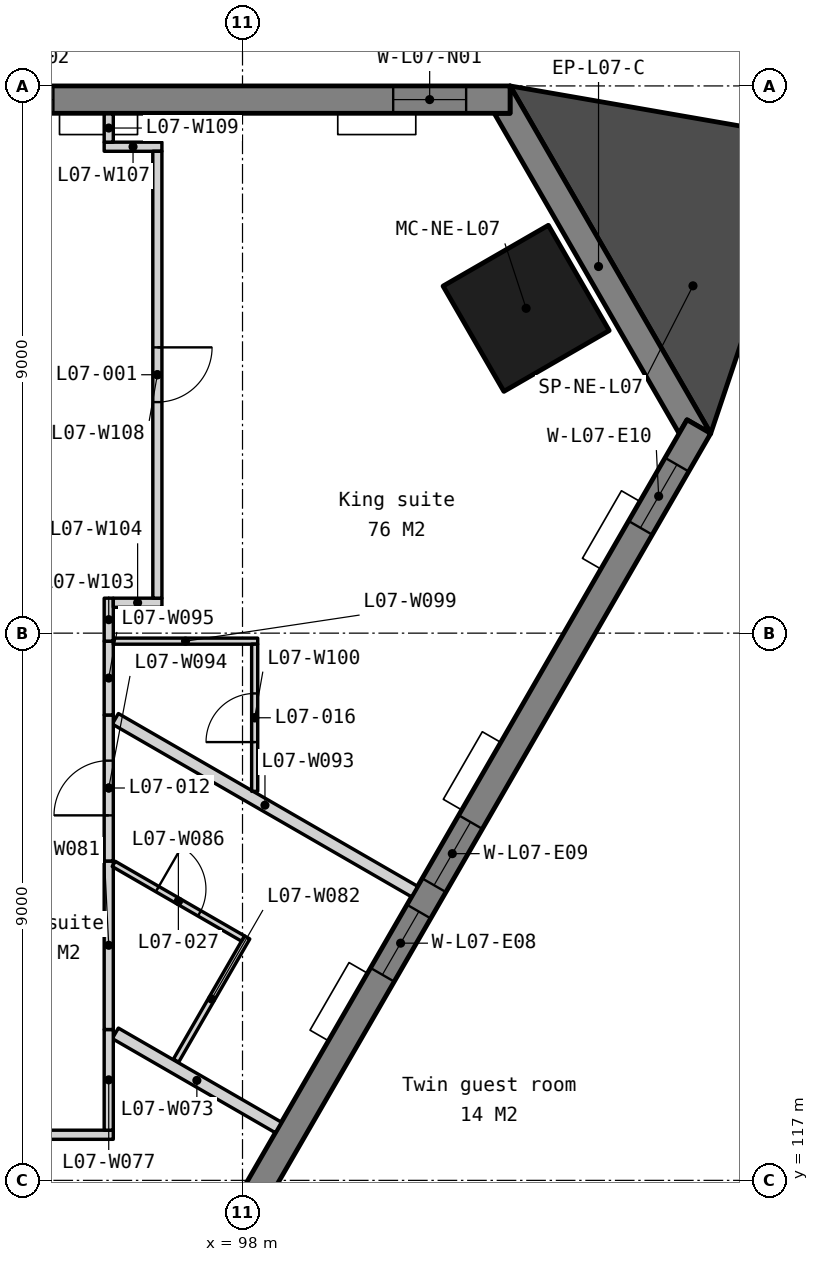
"""IFC4 building model, lengths in metres.
Left out: names, types, materials, properties, quantities, classifications, styles, units other than length and angle.
Written with IfcOpenShell. Run it as: python <this file> out.ifc"""

import sys

from ifc_helpers import new_model, si_unit, direction, frame, frame_2d, origin, origin_2d, place, context, subcontext, project, spatial, polyline, rectangle, outline, extrude, element, fill, save


model = new_model("IFC4")
c1 = context("Model", 3, precision=1e-05, world=origin(), true_north=direction((0.0, 1.0)))
c2 = subcontext(c1, "Body", "Model", "MODEL_VIEW")
j1 = project(units=[si_unit("LENGTHUNIT", "METRE"), si_unit("PLANEANGLEUNIT", "RADIAN")], contexts=[c1])
p1 = place(None, origin())
s1 = spatial("IfcSite", under=j1, at=p1, CompositionType="ELEMENT")
p2 = place(p1, origin())
s2 = spatial("IfcBuilding", under=s1, at=p2, CompositionType="ELEMENT")
p3 = place(p2, frame((0.0, 0.0, 38.5)))
s3 = spatial("IfcBuildingStorey", under=s2, at=p3, CompositionType="ELEMENT", Elevation=38.5)
p4 = place(p3, frame((102.664, 131.342, 0.0), z_axis=(0.0, 0.0, 1.0), x_axis=(-0.5, 0.866025403784, 0.0)))
e1 = element("IfcColumn", 1, at=p4, inside=s3, PredefinedType="COLUMN", context=c2, shape_type="SweptSolid", body=[
    extrude(rectangle(XDim=2.0, YDim=2.0, at=origin_2d()), origin(), (0.0, 0.0, 1.0), 3.5),
])
p5 = place(p3, frame((0.0, 0.0, -0.15)))
e2 = element("IfcWall", 2, at=p5, inside=s3, PredefinedType="SOLIDWALL", context=c2, shape_type="SweptSolid", body=[
    extrude(outline(polyline([(105.7, 129.284), (105.31, 129.509), (105.18, 129.284), (102.14, 134.55), (102.4, 134.55), (102.4, 135.0), (105.7, 129.284)])), origin(), (0.0, 0.0, 1.0), 3.5),
])
p6 = place(p3, frame((102.4, 134.775, -0.15), z_axis=(0.0, 0.0, 1.0), x_axis=(-1.0, 0.0, 0.0)))
e3 = element("IfcWall", 3, at=p6, inside=s3, PredefinedType="SOLIDWALL", context=c2, shape_type="SweptSolid", body=[
    extrude(outline(polyline([(44.8, 0.0), (44.8, 3.5), (0.0, 3.5), (0.0, 0.0), (44.8, 0.0)])), frame((0.0, 0.225, 0.0), z_axis=(0.0, -1.0, 0.0), x_axis=(1.0, 0.0, 0.0)), (0.0, 0.0, 1.0), 0.45),
])
p7 = place(p6, frame((0.722, 0.0, 1.05)))
e4 = element("IfcOpeningElement", 4, at=p7, cuts=e3, PredefinedType="OPENING", context=c2, shape_type="SweptSolid", body=[
    extrude(rectangle(XDim=1.2, YDim=1.5, at=frame_2d((0.6, 0.75))), frame((0.0, 0.235, 0.0), z_axis=(0.0, -1.0, 0.0), x_axis=(1.0, 0.0, 0.0)), (0.0, 0.0, 1.0), 0.47),
])
p8 = place(p6, frame((7.51, 0.0, 1.05)))
e5 = element("IfcOpeningElement", 5, at=p8, cuts=e3, PredefinedType="OPENING", context=c2, shape_type="SweptSolid", body=[
    extrude(rectangle(XDim=1.2, YDim=1.5, at=frame_2d((0.6, 0.75))), frame((0.0, 0.235, 0.0), z_axis=(0.0, -1.0, 0.0), x_axis=(1.0, 0.0, 0.0)), (0.0, 0.0, 1.0), 0.47),
])
p9 = place(p6, frame((9.21, 0.0, 1.05)))
e6 = element("IfcOpeningElement", 6, at=p9, cuts=e3, PredefinedType="OPENING", context=c2, shape_type="SweptSolid", body=[
    extrude(rectangle(XDim=1.2, YDim=1.5, at=frame_2d((0.6, 0.75))), frame((0.0, 0.235, 0.0), z_axis=(0.0, -1.0, 0.0), x_axis=(1.0, 0.0, 0.0)), (0.0, 0.0, 1.0), 0.47),
])
p10 = place(p6, frame((16.47, 0.0, 1.05)))
e7 = element("IfcOpeningElement", 7, at=p10, cuts=e3, PredefinedType="OPENING", context=c2, shape_type="SweptSolid", body=[
    extrude(rectangle(XDim=1.2, YDim=1.5, at=frame_2d((0.6, 0.75))), frame((0.0, 0.235, 0.0), z_axis=(0.0, -1.0, 0.0), x_axis=(1.0, 0.0, 0.0)), (0.0, 0.0, 1.0), 0.47),
])
p11 = place(p6, frame((18.17, 0.0, 1.05)))
e8 = element("IfcOpeningElement", 8, at=p11, cuts=e3, PredefinedType="OPENING", context=c2, shape_type="SweptSolid", body=[
    extrude(rectangle(XDim=1.2, YDim=1.5, at=frame_2d((0.6, 0.75))), frame((0.0, 0.235, 0.0), z_axis=(0.0, -1.0, 0.0), x_axis=(1.0, 0.0, 0.0)), (0.0, 0.0, 1.0), 0.47),
])
p12 = place(p6, frame((25.43, 0.0, 1.05)))
e9 = element("IfcOpeningElement", 9, at=p12, cuts=e3, PredefinedType="OPENING", context=c2, shape_type="SweptSolid", body=[
    extrude(rectangle(XDim=1.2, YDim=1.5, at=frame_2d((0.6, 0.75))), frame((0.0, 0.235, 0.0), z_axis=(0.0, -1.0, 0.0), x_axis=(1.0, 0.0, 0.0)), (0.0, 0.0, 1.0), 0.47),
])
p13 = place(p6, frame((27.13, 0.0, 1.05)))
e10 = element("IfcOpeningElement", 10, at=p13, cuts=e3, PredefinedType="OPENING", context=c2, shape_type="SweptSolid", body=[
    extrude(rectangle(XDim=1.2, YDim=1.5, at=frame_2d((0.6, 0.75))), frame((0.0, 0.235, 0.0), z_axis=(0.0, -1.0, 0.0), x_axis=(1.0, 0.0, 0.0)), (0.0, 0.0, 1.0), 0.47),
])
p14 = place(p6, frame((34.39, 0.0, 1.05)))
e11 = element("IfcOpeningElement", 11, at=p14, cuts=e3, PredefinedType="OPENING", context=c2, shape_type="SweptSolid", body=[
    extrude(rectangle(XDim=1.2, YDim=1.5, at=frame_2d((0.6, 0.75))), frame((0.0, 0.235, 0.0), z_axis=(0.0, -1.0, 0.0), x_axis=(1.0, 0.0, 0.0)), (0.0, 0.0, 1.0), 0.47),
])
p15 = place(p6, frame((36.09, 0.0, 1.05)))
e12 = element("IfcOpeningElement", 12, at=p15, cuts=e3, PredefinedType="OPENING", context=c2, shape_type="SweptSolid", body=[
    extrude(rectangle(XDim=1.2, YDim=1.5, at=frame_2d((0.6, 0.75))), frame((0.0, 0.235, 0.0), z_axis=(0.0, -1.0, 0.0), x_axis=(1.0, 0.0, 0.0)), (0.0, 0.0, 1.0), 0.47),
])
p16 = place(p6, frame((42.878, 0.0, 1.05)))
e13 = element("IfcOpeningElement", 13, at=p16, cuts=e3, PredefinedType="OPENING", context=c2, shape_type="SweptSolid", body=[
    extrude(rectangle(XDim=1.2, YDim=1.5, at=frame_2d((0.6, 0.75))), frame((0.0, 0.235, 0.0), z_axis=(0.0, -1.0, 0.0), x_axis=(1.0, 0.0, 0.0)), (0.0, 0.0, 1.0), 0.47),
])
p17 = place(p3, frame((83.105, 90.599, -0.15), z_axis=(0.0, 0.0, 1.0), x_axis=(0.499999201451, 0.866025864826, 0.0)))
e14 = element("IfcWall", 14, at=p17, inside=s3, PredefinedType="SOLIDWALL", context=c2, shape_type="SweptSolid", body=[
    extrude(outline(polyline([(44.8, 0.0), (44.8, 3.5), (0.0, 3.5), (0.0, 0.0), (44.8, 0.0)])), frame((0.0, 0.225, 0.0), z_axis=(0.0, -1.0, 0.0), x_axis=(1.0, 0.0, 0.0)), (0.0, 0.0, 1.0), 0.45),
])
p18 = place(p17, frame((0.722, 0.0, 1.05)))
e15 = element("IfcOpeningElement", 15, at=p18, cuts=e14, PredefinedType="OPENING", context=c2, shape_type="SweptSolid", body=[
    extrude(rectangle(XDim=1.2, YDim=1.5, at=frame_2d((0.6, 0.75))), frame((0.0, 0.235, 0.0), z_axis=(0.0, -1.0, 0.0), x_axis=(1.0, 0.0, 0.0)), (0.0, 0.0, 1.0), 0.47),
])
p19 = place(p17, frame((7.51, 0.0, 1.05)))
e16 = element("IfcOpeningElement", 16, at=p19, cuts=e14, PredefinedType="OPENING", context=c2, shape_type="SweptSolid", body=[
    extrude(rectangle(XDim=1.2, YDim=1.5, at=frame_2d((0.6, 0.75))), frame((0.0, 0.235, 0.0), z_axis=(0.0, -1.0, 0.0), x_axis=(1.0, 0.0, 0.0)), (0.0, 0.0, 1.0), 0.47),
])
p20 = place(p17, frame((9.21, 0.0, 1.05)))
e17 = element("IfcOpeningElement", 17, at=p20, cuts=e14, PredefinedType="OPENING", context=c2, shape_type="SweptSolid", body=[
    extrude(rectangle(XDim=1.2, YDim=1.5, at=frame_2d((0.6, 0.75))), frame((0.0, 0.235, 0.0), z_axis=(0.0, -1.0, 0.0), x_axis=(1.0, 0.0, 0.0)), (0.0, 0.0, 1.0), 0.47),
])
p21 = place(p17, frame((16.47, 0.0, 1.05)))
e18 = element("IfcOpeningElement", 18, at=p21, cuts=e14, PredefinedType="OPENING", context=c2, shape_type="SweptSolid", body=[
    extrude(rectangle(XDim=1.2, YDim=1.5, at=frame_2d((0.6, 0.75))), frame((0.0, 0.235, 0.0), z_axis=(0.0, -1.0, 0.0), x_axis=(1.0, 0.0, 0.0)), (0.0, 0.0, 1.0), 0.47),
])
p22 = place(p17, frame((18.17, 0.0, 1.05)))
e19 = element("IfcOpeningElement", 19, at=p22, cuts=e14, PredefinedType="OPENING", context=c2, shape_type="SweptSolid", body=[
    extrude(rectangle(XDim=1.2, YDim=1.5, at=frame_2d((0.6, 0.75))), frame((0.0, 0.235, 0.0), z_axis=(0.0, -1.0, 0.0), x_axis=(1.0, 0.0, 0.0)), (0.0, 0.0, 1.0), 0.47),
])
p23 = place(p17, frame((25.43, 0.0, 1.05)))
e20 = element("IfcOpeningElement", 20, at=p23, cuts=e14, PredefinedType="OPENING", context=c2, shape_type="SweptSolid", body=[
    extrude(rectangle(XDim=1.2, YDim=1.5, at=frame_2d((0.6, 0.75))), frame((0.0, 0.235, 0.0), z_axis=(0.0, -1.0, 0.0), x_axis=(1.0, 0.0, 0.0)), (0.0, 0.0, 1.0), 0.47),
])
p24 = place(p17, frame((27.13, 0.0, 1.05)))
e21 = element("IfcOpeningElement", 21, at=p24, cuts=e14, PredefinedType="OPENING", context=c2, shape_type="SweptSolid", body=[
    extrude(rectangle(XDim=1.2, YDim=1.5, at=frame_2d((0.6, 0.75))), frame((0.0, 0.235, 0.0), z_axis=(0.0, -1.0, 0.0), x_axis=(1.0, 0.0, 0.0)), (0.0, 0.0, 1.0), 0.47),
])
p25 = place(p17, frame((34.39, 0.0, 1.05)))
e22 = element("IfcOpeningElement", 22, at=p25, cuts=e14, PredefinedType="OPENING", context=c2, shape_type="SweptSolid", body=[
    extrude(rectangle(XDim=1.2, YDim=1.5, at=frame_2d((0.6, 0.75))), frame((0.0, 0.235, 0.0), z_axis=(0.0, -1.0, 0.0), x_axis=(1.0, 0.0, 0.0)), (0.0, 0.0, 1.0), 0.47),
])
p26 = place(p17, frame((36.09, 0.0, 1.05)))
e23 = element("IfcOpeningElement", 23, at=p26, cuts=e14, PredefinedType="OPENING", context=c2, shape_type="SweptSolid", body=[
    extrude(rectangle(XDim=1.2, YDim=1.5, at=frame_2d((0.6, 0.75))), frame((0.0, 0.235, 0.0), z_axis=(0.0, -1.0, 0.0), x_axis=(1.0, 0.0, 0.0)), (0.0, 0.0, 1.0), 0.47),
])
p27 = place(p17, frame((42.878, 0.0, 1.05)))
e24 = element("IfcOpeningElement", 24, at=p27, cuts=e14, PredefinedType="OPENING", context=c2, shape_type="SweptSolid", body=[
    extrude(rectangle(XDim=1.2, YDim=1.5, at=frame_2d((0.6, 0.75))), frame((0.0, 0.235, 0.0), z_axis=(0.0, -1.0, 0.0), x_axis=(1.0, 0.0, 0.0)), (0.0, 0.0, 1.0), 0.47),
])
p28 = place(p3, frame((0.0, 0.0, -0.15)))
e25 = element("IfcWall", 25, at=p28, inside=s3, PredefinedType="SOLIDWALL", context=c2, shape_type="SweptSolid", body=[
    extrude(outline(polyline([(105.7, 129.284), (107.336, 134.14), (102.4, 135.0), (105.7, 129.284)])), origin(), (0.0, 0.0, 1.0), 3.5),
])
p29 = place(p3, frame((90.626, 117.75, 0.0), z_axis=(0.0, 0.0, 1.0), x_axis=(1.0, 0.0, 0.0)))
e26 = element("IfcWall", 26, at=p29, inside=s3, PredefinedType="PARTITIONING", context=c2, shape_type="SweptSolid", body=[
    extrude(rectangle(XDim=5.249, YDim=0.15, at=frame_2d((2.625, 0.0))), origin(), (0.0, 0.0, 1.0), 3.35),
])
p30 = place(p29, frame((2.125, 0.0, 0.0)))
e27 = element("IfcOpeningElement", 27, at=p30, cuts=e26, PredefinedType="OPENING", context=c2, shape_type="SweptSolid", body=[
    extrude(rectangle(XDim=1.0, YDim=2.1, at=frame_2d((0.5, 1.05))), frame((0.0, 0.085, 0.0), z_axis=(0.0, -1.0, 0.0), x_axis=(1.0, 0.0, 0.0)), (0.0, 0.0, 1.0), 0.17),
])
p31 = place(p3, frame((95.908, 119.418, 0.0), z_axis=(0.0, 0.0, 1.0), x_axis=(0.866051688794, -0.499954470265, 0.0)))
e28 = element("IfcWall", 28, at=p31, inside=s3, PredefinedType="PARTITIONING", context=c2, shape_type="SweptSolid", body=[
    extrude(rectangle(XDim=3.097, YDim=0.2, at=frame_2d((1.548, 0.0))), origin(), (0.0, 0.0, 1.0), 3.35),
])
p32 = place(p3, frame((95.8, 117.825, 0.0), z_axis=(0.0, 0.0, 1.0), x_axis=(0.0, 1.0, 0.0)))
e29 = element("IfcWall", 29, at=p32, inside=s3, PredefinedType="PARTITIONING", context=c2, shape_type="SweptSolid", body=[
    extrude(rectangle(XDim=1.656, YDim=0.15, at=frame_2d((0.828, 0.0))), origin(), (0.0, 0.0, 1.0), 3.35),
])
p33 = place(p3, frame((95.8, 119.481, 0.0), z_axis=(0.0, 0.0, 1.0), x_axis=(0.0, 1.0, 0.0)))
e30 = element("IfcWall", 30, at=p33, inside=s3, PredefinedType="PARTITIONING", context=c2, shape_type="SweptSolid", body=[
    extrude(rectangle(XDim=2.771, YDim=0.15, at=frame_2d((1.386, 0.0))), origin(), (0.0, 0.0, 1.0), 3.35),
])
p34 = place(p3, frame((96.907, 118.969, 0.0), z_axis=(0.0, 0.0, 1.0), x_axis=(0.499999433879, 0.866025730634, 0.0)))
e31 = element("IfcWall", 31, at=p34, inside=s3, PredefinedType="PARTITIONING", context=c2, shape_type="SweptSolid", body=[
    extrude(rectangle(XDim=2.34, YDim=0.1, at=frame_2d((1.17, 0.0))), origin(), (0.0, 0.0, 1.0), 3.35),
])
p35 = place(p3, frame((95.882, 122.205, 0.0), z_axis=(0.0, 0.0, 1.0), x_axis=(0.866006720078, -0.500032359733, 0.0)))
e32 = element("IfcWall", 32, at=p35, inside=s3, PredefinedType="PARTITIONING", context=c2, shape_type="SweptSolid", body=[
    extrude(rectangle(XDim=2.455, YDim=0.1, at=frame_2d((1.228, 0.0))), origin(), (0.0, 0.0, 1.0), 3.35),
])
p36 = place(p35, frame((0.827, 0.0, 0.0)))
e33 = element("IfcOpeningElement", 33, at=p36, cuts=e32, PredefinedType="OPENING", context=c2, shape_type="SweptSolid", body=[
    extrude(rectangle(XDim=0.8, YDim=2.1, at=frame_2d((0.4, 1.05))), frame((0.0, 0.06, 0.0), z_axis=(0.0, -1.0, 0.0), x_axis=(1.0, 0.0, 0.0)), (0.0, 0.0, 1.0), 0.12),
])
p37 = place(p3, frame((95.908, 124.591, 0.0), z_axis=(0.0, 0.0, 1.0), x_axis=(0.866043237112, -0.499969110498, 0.0)))
e34 = element("IfcWall", 34, at=p37, inside=s3, PredefinedType="PARTITIONING", context=c2, shape_type="SweptSolid", body=[
    extrude(rectangle(XDim=5.683, YDim=0.2, at=frame_2d((2.842, 0.0))), origin(), (0.0, 0.0, 1.0), 3.35),
])
p38 = place(p3, frame((95.8, 122.252, 0.0), z_axis=(0.0, 0.0, 1.0), x_axis=(0.0, 1.0, 0.0)))
e35 = element("IfcWall", 35, at=p38, inside=s3, PredefinedType="PARTITIONING", context=c2, shape_type="SweptSolid", body=[
    extrude(rectangle(XDim=2.402, YDim=0.15, at=frame_2d((1.201, 0.0))), origin(), (0.0, 0.0, 1.0), 3.35),
])
p39 = place(p38, frame((0.751, 0.0, 0.0)))
e36 = element("IfcOpeningElement", 36, at=p39, cuts=e35, PredefinedType="OPENING", context=c2, shape_type="SweptSolid", body=[
    extrude(rectangle(XDim=0.9, YDim=2.1, at=frame_2d((0.45, 1.05))), frame((0.0, 0.085, 0.0), z_axis=(0.0, -1.0, 0.0), x_axis=(1.0, 0.0, 0.0)), (0.0, 0.0, 1.0), 0.17),
])
p40 = place(p3, frame((95.8, 124.654, 0.0), z_axis=(0.0, 0.0, 1.0), x_axis=(0.0, 1.0, 0.0)))
e37 = element("IfcWall", 37, at=p40, inside=s3, PredefinedType="PARTITIONING", context=c2, shape_type="SweptSolid", body=[
    extrude(rectangle(XDim=1.214, YDim=0.15, at=frame_2d((0.607, 0.0))), origin(), (0.0, 0.0, 1.0), 3.35),
])
p41 = place(p3, frame((95.875, 125.868, 0.0), z_axis=(0.0, 0.0, 1.0), x_axis=(1.0, 0.0, 0.0)))
e38 = element("IfcWall", 38, at=p41, inside=s3, PredefinedType="PARTITIONING", context=c2, shape_type="SweptSolid", body=[
    extrude(rectangle(XDim=2.375, YDim=0.1, at=frame_2d((1.188, 0.0))), origin(), (0.0, 0.0, 1.0), 3.35),
])
p42 = place(p3, frame((98.2, 123.398, 0.0), z_axis=(0.0, 0.0, 1.0), x_axis=(0.0, 1.0, 0.0)))
e39 = element("IfcWall", 39, at=p42, inside=s3, PredefinedType="PARTITIONING", context=c2, shape_type="SweptSolid", body=[
    extrude(rectangle(XDim=2.42, YDim=0.1, at=frame_2d((1.21, 0.0))), origin(), (0.0, 0.0, 1.0), 3.35),
])
p43 = place(p42, frame((0.81, 0.0, 0.0)))
e40 = element("IfcOpeningElement", 40, at=p43, cuts=e39, PredefinedType="OPENING", context=c2, shape_type="SweptSolid", body=[
    extrude(rectangle(XDim=0.8, YDim=2.1, at=frame_2d((0.4, 1.05))), frame((0.0, 0.06, 0.0), z_axis=(0.0, -1.0, 0.0), x_axis=(1.0, 0.0, 0.0)), (0.0, 0.0, 1.0), 0.12),
])
p44 = place(p3, frame((95.8, 125.868, 0.0), z_axis=(0.0, 0.0, 1.0), x_axis=(0.0, 1.0, 0.0)))
e41 = element("IfcWall", 41, at=p44, inside=s3, PredefinedType="PARTITIONING", context=c2, shape_type="SweptSolid", body=[
    extrude(rectangle(XDim=0.707, YDim=0.15, at=frame_2d((0.354, 0.0))), origin(), (0.0, 0.0, 1.0), 3.35),
])
p45 = place(p3, frame((95.875, 126.5, 0.0), z_axis=(0.0, 0.0, 1.0), x_axis=(1.0, 0.0, 0.0)))
e42 = element("IfcWall", 42, at=p45, inside=s3, PredefinedType="PARTITIONING", context=c2, shape_type="SweptSolid", body=[
    extrude(rectangle(XDim=0.8, YDim=0.15, at=frame_2d((0.4, 0.0))), origin(), (0.0, 0.0, 1.0), 3.35),
])
p46 = place(p3, frame((95.725, 134.0, 0.0), z_axis=(0.0, 0.0, 1.0), x_axis=(1.0, 0.0, 0.0)))
e43 = element("IfcWall", 43, at=p46, inside=s3, PredefinedType="PARTITIONING", context=c2, shape_type="SweptSolid", body=[
    extrude(rectangle(XDim=0.949, YDim=0.15, at=frame_2d((0.475, 0.0))), origin(), (0.0, 0.0, 1.0), 2.887),
])
p47 = place(p3, frame((96.6, 133.925, 0.0), z_axis=(0.0, 0.0, 1.0), x_axis=(6.643194e-05, -0.999999997793, 0.0)))
e44 = element("IfcWall", 44, at=p47, inside=s3, PredefinedType="PARTITIONING", context=c2, shape_type="SweptSolid", body=[
    extrude(rectangle(XDim=7.35, YDim=0.15, at=frame_2d((3.675, 0.0))), origin(), (0.0, 0.0, 1.0), 3.35),
])
p48 = place(p47, frame((3.225, 0.0, 0.0)))
e45 = element("IfcOpeningElement", 45, at=p48, cuts=e44, PredefinedType="OPENING", context=c2, shape_type="SweptSolid", body=[
    extrude(rectangle(XDim=0.9, YDim=2.1, at=frame_2d((0.45, 1.05))), frame((0.0, 0.085, 0.0), z_axis=(0.0, -1.0, 0.0), x_axis=(1.0, 0.0, 0.0)), (0.0, 0.0, 1.0), 0.17),
])
p49 = place(p3, frame((95.8, 134.075, 0.0), z_axis=(0.0, 0.0, 1.0), x_axis=(0.0, 1.0, 0.0)))
e46 = element("IfcWall", 46, at=p49, inside=s3, PredefinedType="PARTITIONING", context=c2, shape_type="SweptSolid", body=[
    extrude(rectangle(XDim=0.465, YDim=0.15, at=frame_2d((0.232, 0.0))), origin(), (0.0, 0.0, 1.0), 3.35),
])
p50 = place(p7, origin())
e47 = element("IfcWindow", 47, at=p50, inside=s3, PartitioningType="SINGLE_PANEL", PredefinedType="WINDOW", context=c2, shape_type="SweptSolid", body=[
    extrude(rectangle(XDim=1.2, YDim=1.5, at=frame_2d((0.6, 0.75))), frame((0.0, 0.03, 0.0), z_axis=(0.0, -1.0, 0.0), x_axis=(1.0, 0.0, 0.0)), (0.0, 0.0, 1.0), 0.06),
])
fill(e4, e47)
p51 = place(p8, origin())
e48 = element("IfcWindow", 48, at=p51, inside=s3, PartitioningType="SINGLE_PANEL", PredefinedType="WINDOW", context=c2, shape_type="SweptSolid", body=[
    extrude(rectangle(XDim=1.2, YDim=1.5, at=frame_2d((0.6, 0.75))), frame((0.0, 0.03, 0.0), z_axis=(0.0, -1.0, 0.0), x_axis=(1.0, 0.0, 0.0)), (0.0, 0.0, 1.0), 0.06),
])
fill(e5, e48)
p52 = place(p25, origin())
e49 = element("IfcWindow", 49, at=p52, inside=s3, PartitioningType="SINGLE_PANEL", PredefinedType="WINDOW", context=c2, shape_type="SweptSolid", body=[
    extrude(rectangle(XDim=1.2, YDim=1.5, at=frame_2d((0.6, 0.75))), frame((0.0, 0.03, 0.0), z_axis=(0.0, -1.0, 0.0), x_axis=(1.0, 0.0, 0.0)), (0.0, 0.0, 1.0), 0.06),
])
fill(e22, e49)
p53 = place(p26, origin())
e50 = element("IfcWindow", 50, at=p53, inside=s3, PartitioningType="SINGLE_PANEL", PredefinedType="WINDOW", context=c2, shape_type="SweptSolid", body=[
    extrude(rectangle(XDim=1.2, YDim=1.5, at=frame_2d((0.6, 0.75))), frame((0.0, 0.03, 0.0), z_axis=(0.0, -1.0, 0.0), x_axis=(1.0, 0.0, 0.0)), (0.0, 0.0, 1.0), 0.06),
])
fill(e23, e50)
p54 = place(p27, origin())
e51 = element("IfcWindow", 51, at=p54, inside=s3, PartitioningType="SINGLE_PANEL", PredefinedType="WINDOW", context=c2, shape_type="SweptSolid", body=[
    extrude(rectangle(XDim=1.2, YDim=1.5, at=frame_2d((0.6, 0.75))), frame((0.0, 0.03, 0.0), z_axis=(0.0, -1.0, 0.0), x_axis=(1.0, 0.0, 0.0)), (0.0, 0.0, 1.0), 0.06),
])
fill(e24, e51)
p55 = place(p48, origin())
e52 = element("IfcDoor", 52, at=p55, inside=s3, OperationType="SINGLE_SWING_LEFT", PredefinedType="DOOR", context=c2, shape_type="SweptSolid", body=[
    extrude(rectangle(XDim=0.9, YDim=2.1, at=frame_2d((0.45, 1.05))), frame((0.0, 0.025, 0.0), z_axis=(0.0, -1.0, 0.0), x_axis=(1.0, 0.0, 0.0)), (0.0, 0.0, 1.0), 0.05),
])
fill(e45, e52)
p56 = place(p39, origin())
e53 = element("IfcDoor", 53, at=p56, inside=s3, OperationType="SINGLE_SWING_LEFT", PredefinedType="DOOR", context=c2, shape_type="SweptSolid", body=[
    extrude(rectangle(XDim=0.9, YDim=2.1, at=frame_2d((0.45, 1.05))), frame((0.0, 0.025, 0.0), z_axis=(0.0, -1.0, 0.0), x_axis=(1.0, 0.0, 0.0)), (0.0, 0.0, 1.0), 0.05),
])
fill(e36, e53)
p57 = place(p43, origin())
e54 = element("IfcDoor", 54, at=p57, inside=s3, OperationType="SINGLE_SWING_LEFT", PredefinedType="DOOR", context=c2, shape_type="SweptSolid", body=[
    extrude(rectangle(XDim=0.8, YDim=2.1, at=frame_2d((0.4, 1.05))), frame((0.0, 0.025, 0.0), z_axis=(0.0, -1.0, 0.0), x_axis=(1.0, 0.0, 0.0)), (0.0, 0.0, 1.0), 0.05),
])
fill(e40, e54)
p58 = place(p36, origin())
e55 = element("IfcDoor", 55, at=p58, inside=s3, OperationType="SINGLE_SWING_LEFT", PredefinedType="DOOR", context=c2, shape_type="SweptSolid", body=[
    extrude(rectangle(XDim=0.8, YDim=2.1, at=frame_2d((0.4, 1.05))), frame((0.0, 0.025, 0.0), z_axis=(0.0, -1.0, 0.0), x_axis=(1.0, 0.0, 0.0)), (0.0, 0.0, 1.0), 0.05),
])
fill(e33, e55)
save(model, sys.argv[1])
